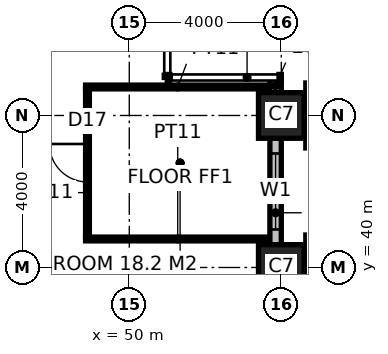
"""IFC4 building model, lengths in metres.
Left out: names, types, materials, properties, quantities, classifications, styles, units other than length and angle.
Written with IfcOpenShell. Run it as: python <this file> out.ifc"""

import sys

from ifc_helpers import new_model, si_unit, direction, frame, frame_2d, origin, origin_2d, place, context, subcontext, project, spatial, rectangle, hollow_rectangle, extrude, element, fill, save


model = new_model("IFC4")
c1 = context("Model", 3, precision=1e-05, world=origin(), true_north=direction((0.0, 1.0)))
c2 = subcontext(c1, "Body", "Model", "MODEL_VIEW")
j1 = project(units=[si_unit("LENGTHUNIT", "METRE"), si_unit("PLANEANGLEUNIT", "RADIAN")], contexts=[c1])
p1 = place(None, origin())
s1 = spatial("IfcSite", under=j1, at=p1, CompositionType="ELEMENT")
p2 = place(p1, origin())
s2 = spatial("IfcBuilding", under=s1, at=p2, CompositionType="ELEMENT")
p3 = place(p2, frame((0.0, 0.0, 63.0)))
s3 = spatial("IfcBuildingStorey", under=s2, at=p3, CompositionType="ELEMENT", Elevation=63.0)
for number, where, z_axis, x_axis in (
    (1, (54.0, 40.0, 0.0), (0.0, 0.0, 1.0), (1.0, 0.0, 0.0)),
    (2, (54.0, 44.0, 0.0), (0.0, 0.0, 1.0), (1.0, 0.0, 0.0)),
):
    element("IfcColumn", number, at=place(p3, frame(where, z_axis=z_axis, x_axis=x_axis)), inside=s3, PredefinedType="COLUMN", context=c2, shape_type="SweptSolid", body=[
        extrude(hollow_rectangle(XDim=1.2, YDim=1.2, WallThickness=0.1, at=origin_2d()), origin(), (0.0, 0.0, 1.0), 4.0),
    ])
for number, where, z_axis, x_axis in (
    (3, (48.85, 40.75, 0.0), (0.0, 0.0, 1.0), (1.0, 0.0, 0.0)),
    (4, (48.85, 44.75, 0.0), (0.0, 0.0, 1.0), (1.0, 0.0, 0.0)),
):
    element("IfcWall", number, at=place(p3, frame(where, z_axis=z_axis, x_axis=x_axis)), inside=s3, PredefinedType="PARTITIONING", context=c2, shape_type="SweptSolid", body=[
        extrude(rectangle(XDim=4.85, YDim=0.1, at=frame_2d((2.425, 0.0))), origin(), (0.0, 0.0, 1.0), 3.85),
    ])
p4 = place(p3, frame((48.9, 40.8, 0.0), z_axis=(0.0, 0.0, 1.0), x_axis=(0.0, 1.0, 0.0)))
e5 = element("IfcWall", 5, at=p4, inside=s3, PredefinedType="PARTITIONING", context=c2, shape_type="SweptSolid", body=[
    extrude(rectangle(XDim=3.9, YDim=0.1, at=frame_2d((1.95, 0.0))), origin(), (0.0, 0.0, 1.0), 3.85),
])
p5 = place(p4, frame((1.45, 0.0, 0.0)))
e6 = element("IfcOpeningElement", 6, at=p5, cuts=e5, PredefinedType="OPENING", context=c2, shape_type="SweptSolid", body=[
    extrude(rectangle(XDim=1.0, YDim=2.2, at=frame_2d((0.5, 1.1))), frame((0.0, 0.06, 0.0), z_axis=(0.0, -1.0, 0.0), x_axis=(1.0, 0.0, 0.0)), (0.0, 0.0, 1.0), 0.12),
])
p6 = place(p3, frame((53.85, 40.6, 0.0), z_axis=(0.0, 0.0, 1.0), x_axis=(0.0, 1.0, 0.0)))
e7 = element("IfcWall", 7, at=p6, inside=s3, PredefinedType="ELEMENTEDWALL", context=c2, shape_type="SweptSolid", body=[
    extrude(rectangle(XDim=2.8, YDim=0.3, at=frame_2d((1.4, 0.0))), origin(), (0.0, 0.0, 1.0), 2.85),
])
p7 = place(p6, frame((0.4, 0.0, 0.8)))
e8 = element("IfcOpeningElement", 8, at=p7, cuts=e7, PredefinedType="OPENING", context=c2, shape_type="SweptSolid", body=[
    extrude(rectangle(XDim=2.0, YDim=2.0, at=frame_2d((1.0, 1.0))), frame((0.0, 0.16, 0.0), z_axis=(0.0, -1.0, 0.0), x_axis=(1.0, 0.0, 0.0)), (0.0, 0.0, 1.0), 0.32),
])
p8 = place(p3, frame((53.85, 44.6, 0.0), z_axis=(0.0, 0.0, 1.0), x_axis=(0.0, 1.0, 0.0)))
e9 = element("IfcWall", 9, at=p8, inside=s3, PredefinedType="ELEMENTEDWALL", context=c2, shape_type="SweptSolid", body=[
    extrude(rectangle(XDim=0.37, YDim=0.3, at=frame_2d((0.185, 0.0))), origin(), (0.0, 0.0, 1.0), 2.95),
])
p9 = place(p5, origin())
e10 = element("IfcDoor", 10, at=p9, inside=s3, OperationType="SINGLE_SWING_RIGHT", PredefinedType="DOOR", context=c2, shape_type="SweptSolid", body=[
    extrude(rectangle(XDim=1.0, YDim=2.2, at=frame_2d((0.5, 1.1))), frame((0.0, 0.025, 0.0), z_axis=(0.0, -1.0, 0.0), x_axis=(1.0, 0.0, 0.0)), (0.0, 0.0, 1.0), 0.05),
])
fill(e6, e10)
p10 = place(p7, origin())
e11 = element("IfcWindow", 11, at=p10, inside=s3, PartitioningType="SINGLE_PANEL", PredefinedType="WINDOW", context=c2, shape_type="SweptSolid", body=[
    extrude(rectangle(XDim=2.0, YDim=2.0, at=frame_2d((1.0, 1.0))), frame((0.0, 0.03, 0.0), z_axis=(0.0, -1.0, 0.0), x_axis=(1.0, 0.0, 0.0)), (0.0, 0.0, 1.0), 0.06),
])
fill(e8, e11)
save(model, sys.argv[1])
